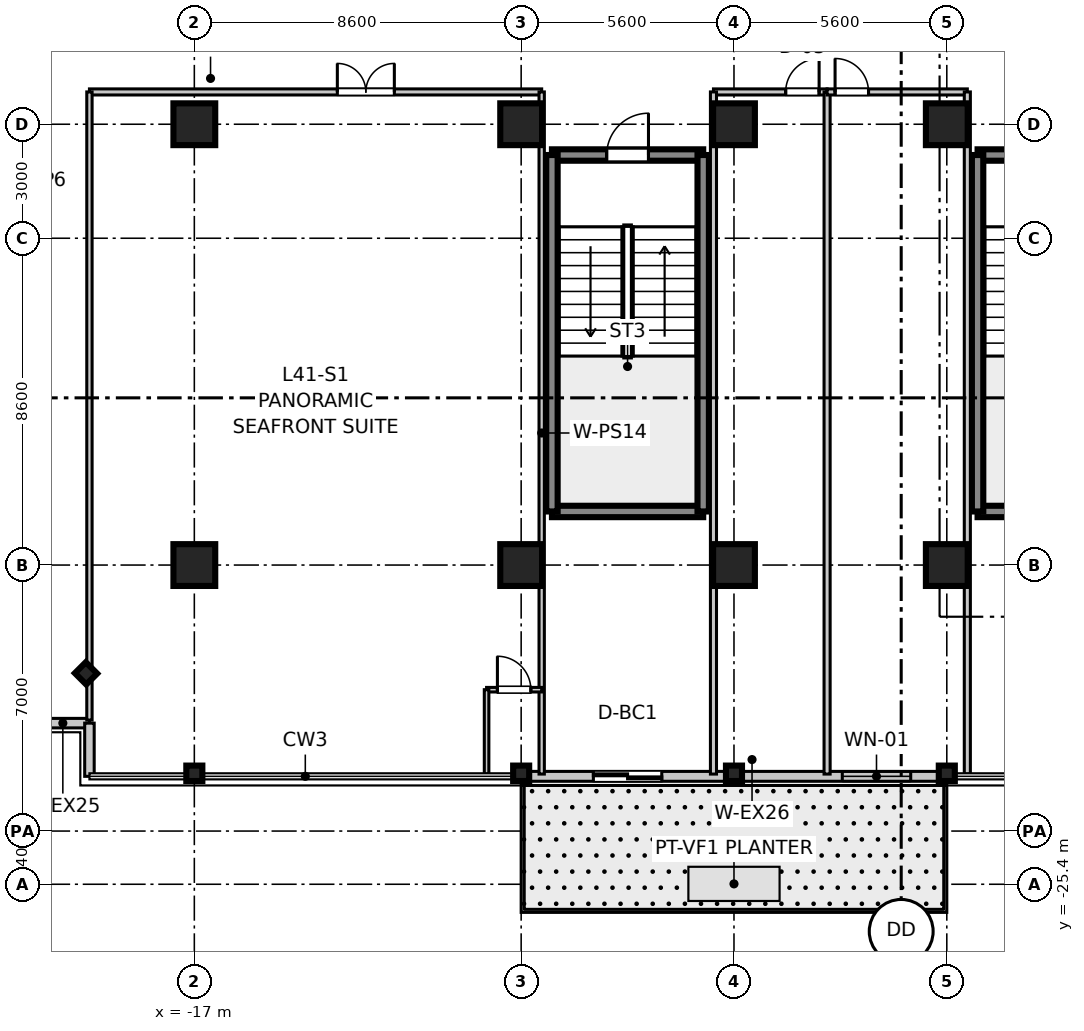
"""IFC4 building model, lengths in metres.
Left out: names, types, materials, properties, quantities, classifications, styles, units other than length and angle.
Written with IfcOpenShell. Run it as: python <this file> out.ifc"""

import sys

from ifc_helpers import new_model, si_unit, direction, frame, frame_2d, origin, origin_2d, place, context, subcontext, project, spatial, rectangle, i_section, extrude, source, transform, mapped, element, fill, save


model = new_model("IFC4")
c1 = context("Model", 3, precision=1e-05, world=origin(), true_north=direction((0.0, 1.0)))
c2 = subcontext(c1, "Body", "Model", "MODEL_VIEW")
j1 = project(units=[si_unit("LENGTHUNIT", "METRE"), si_unit("PLANEANGLEUNIT", "RADIAN")], contexts=[c1])
p1 = place(None, origin())
s1 = spatial("IfcSite", under=j1, at=p1, CompositionType="ELEMENT")
p2 = place(p1, origin())
s2 = spatial("IfcBuilding", under=s1, at=p2, CompositionType="ELEMENT")
p3 = place(p2, frame((0.0, 0.0, 163.6)))
s3 = spatial("IfcBuildingStorey", under=s2, at=p3, CompositionType="ELEMENT", Elevation=163.6)
m1 = source(origin(), c2, "Body", "SweptSolid", [
    extrude(rectangle(XDim=1.1, YDim=1.1, at=origin_2d()), origin(), (0.0, 0.0, 1.0), 3.605),
])
for number, where, z_axis, x_axis in (
    (1, (-17.0, -17.0, 0.0), (0.0, 0.0, 1.0), (1.0, 0.0, 0.0)),
    (2, (-17.0, -5.4, 0.0), (0.0, 0.0, 1.0), (1.0, 0.0, 0.0)),
    (3, (-8.4, -17.0, 0.0), (0.0, 0.0, 1.0), (1.0, 0.0, 0.0)),
    (4, (-8.4, -5.4, 0.0), (0.0, 0.0, 1.0), (1.0, 0.0, 0.0)),
    (5, (-2.8, -17.0, 0.0), (0.0, 0.0, 1.0), (1.0, 0.0, 0.0)),
    (6, (-2.8, -5.4, 0.0), (0.0, 0.0, 1.0), (1.0, 0.0, 0.0)),
    (7, (2.8, -17.0, 0.0), (0.0, 0.0, 1.0), (1.0, 0.0, 0.0)),
    (8, (2.8, -5.4, 0.0), (0.0, 0.0, 1.0), (1.0, 0.0, 0.0)),
):
    element("IfcColumn", number, at=place(p3, frame(where, z_axis=z_axis, x_axis=x_axis)), inside=s3, PredefinedType="COLUMN", context=c2, shape_type="MappedRepresentation", body=[
        mapped(m1, transform((0.0, 0.0, 0.0), scale=1.0)),
    ])
m2 = source(origin(), c2, "Body", "SweptSolid", [
    extrude(i_section(OverallWidth=0.406, OverallDepth=0.422, WebThickness=0.019, FlangeThickness=0.03, at=origin_2d()), origin(), (0.0, 0.0, 1.0), 3.605),
])
for number, where, z_axis, x_axis in (
    (9, (-17.0, -22.48, 0.0), (0.0, 0.0, 1.0), (0.0, 1.0, 0.0)),
    (10, (-8.4, -22.48, 0.0), (0.0, 0.0, 1.0), (0.0, 1.0, 0.0)),
    (11, (-2.8, -22.48, 0.0), (0.0, 0.0, 1.0), (0.0, 1.0, 0.0)),
    (12, (2.8, -22.48, 0.0), (0.0, 0.0, 1.0), (0.0, 1.0, 0.0)),
    (13, (-19.85, -19.85, 0.0), (0.0, 0.0, 1.0), (0.707, 0.707, 0.0)),
):
    element("IfcColumn", number, at=place(p3, frame(where, z_axis=z_axis, x_axis=x_axis)), inside=s3, PredefinedType="COLUMN", context=c2, shape_type="MappedRepresentation", body=[
        mapped(m2, transform((0.0, 0.0, 0.0), scale=1.0)),
    ])
m3 = source(origin(), c2, "Body", "SweptSolid", [
    extrude(rectangle(XDim=3.98, YDim=0.3, at=frame_2d((1.99, 0.0))), origin(), (0.0, 0.0, 1.0), 3.39),
])
for number, where, z_axis, x_axis in (
    (14, (3.61, -15.59, 0.0), (0.0, 0.0, 1.0), (1.0, 0.0, 0.0)),
    (15, (3.61, -6.21, 0.0), (0.0, 0.0, 1.0), (1.0, 0.0, 0.0)),
):
    element("IfcWall", number, at=place(p3, frame(where, z_axis=z_axis, x_axis=x_axis)), inside=s3, PredefinedType="SHEAR", context=c2, shape_type="MappedRepresentation", body=[
        mapped(m3, transform((0.0, 0.0, 0.0), scale=1.0)),
    ])
m4 = source(origin(), c2, "Body", "SweptSolid", [
    extrude(rectangle(XDim=9.38, YDim=0.3, at=frame_2d((4.69, 0.0))), origin(), (0.0, 0.0, 1.0), 3.39),
])
p4 = place(p3, frame((3.61, -15.59, 0.0), z_axis=(0.0, 0.0, 1.0), x_axis=(0.0, 1.0, 0.0)))
e16 = element("IfcWall", 16, at=p4, inside=s3, PredefinedType="SHEAR", context=c2, shape_type="MappedRepresentation", body=[
    mapped(m4, transform((0.0, 0.0, 0.0), scale=1.0)),
])
p5 = place(p3, frame((-7.59, -15.59, 0.0), z_axis=(0.0, 0.0, 1.0), x_axis=(1.0, 0.0, 0.0)))
e17 = element("IfcWall", 17, at=p5, inside=s3, PredefinedType="SHEAR", context=c2, shape_type="MappedRepresentation", body=[
    mapped(m3, transform((0.0, 0.0, 0.0), scale=1.0)),
])
p6 = place(p3, frame((-7.59, -6.21, 0.0), z_axis=(0.0, 0.0, 1.0), x_axis=(1.0, 0.0, 0.0)))
e18 = element("IfcWall", 18, at=p6, inside=s3, PredefinedType="SHEAR", context=c2, shape_type="MappedRepresentation", body=[
    mapped(m3, transform((0.0, 0.0, 0.0), scale=1.0)),
])
p7 = place(p6, frame((1.44, 0.0, 0.0)))
e19 = element("IfcOpeningElement", 19, at=p7, cuts=e18, PredefinedType="OPENING", context=c2, shape_type="SweptSolid", body=[
    extrude(rectangle(XDim=1.1, YDim=2.15, at=frame_2d((0.55, 1.075))), frame((0.0, 0.16, 0.0), z_axis=(0.0, -1.0, 0.0), x_axis=(1.0, 0.0, 0.0)), (0.0, 0.0, 1.0), 0.32),
])
for number, where, z_axis, x_axis in (
    (20, (-7.59, -15.59, 0.0), (0.0, 0.0, 1.0), (0.0, 1.0, 0.0)),
    (21, (-3.61, -15.59, 0.0), (0.0, 0.0, 1.0), (0.0, 1.0, 0.0)),
):
    element("IfcWall", number, at=place(p3, frame(where, z_axis=z_axis, x_axis=x_axis)), inside=s3, PredefinedType="SHEAR", context=c2, shape_type="MappedRepresentation", body=[
        mapped(m4, transform((0.0, 0.0, 0.0), scale=1.0)),
    ])
m5 = source(origin(), c2, "Body", "SweptSolid", [
    extrude(rectangle(XDim=1.4, YDim=0.25, at=frame_2d((0.7, 0.0))), origin(), (0.0, 0.0, 1.0), 3.39),
])
p8 = place(p3, frame((-21.16, -21.16, 0.0), z_axis=(0.0, 0.0, 1.0), x_axis=(1.0, 0.0, 0.0)))
e22 = element("IfcWall", 22, at=p8, inside=s3, PredefinedType="STANDARD", context=c2, shape_type="MappedRepresentation", body=[
    mapped(m5, transform((0.0, 0.0, 0.0), scale=1.0)),
])
m6 = source(origin(), c2, "Body", "SweptSolid", [
    extrude(rectangle(XDim=1.4, YDim=0.25, at=frame_2d((0.7, 0.0))), origin(), (0.0, 0.0, 1.0), 3.39),
])
p9 = place(p3, frame((-19.76, -22.56, 0.0), z_axis=(0.0, 0.0, 1.0), x_axis=(0.0, 1.0, 0.0)))
e23 = element("IfcWall", 23, at=p9, inside=s3, PredefinedType="STANDARD", context=c2, shape_type="MappedRepresentation", body=[
    mapped(m6, transform((0.0, 0.0, 0.0), scale=1.0)),
])
m7 = source(origin(), c2, "Body", "SweptSolid", [
    extrude(rectangle(XDim=11.2, YDim=0.26, at=frame_2d((5.6, 0.0))), origin(), (0.0, 0.0, 1.0), 2.87),
])
p10 = place(p3, frame((-8.4, -22.56, 0.0), z_axis=(0.0, 0.0, 1.0), x_axis=(1.0, 0.0, 0.0)))
e24 = element("IfcWall", 24, at=p10, inside=s3, PredefinedType="STANDARD", context=c2, shape_type="MappedRepresentation", body=[
    mapped(m7, transform((0.0, 0.0, 0.0), scale=1.0)),
])
p11 = place(p10, frame((1.9, 0.0, 0.0)))
e25 = element("IfcOpeningElement", 25, at=p11, cuts=e24, PredefinedType="OPENING", context=c2, shape_type="SweptSolid", body=[
    extrude(rectangle(XDim=1.8, YDim=2.25, at=frame_2d((0.9, 1.125))), frame((0.0, 0.14, 0.0), z_axis=(0.0, -1.0, 0.0), x_axis=(1.0, 0.0, 0.0)), (0.0, 0.0, 1.0), 0.28),
])
p12 = place(p10, frame((8.45, 0.0, 0.85)))
e26 = element("IfcOpeningElement", 26, at=p12, cuts=e24, PredefinedType="OPENING", context=c2, shape_type="SweptSolid", body=[
    extrude(rectangle(XDim=1.8, YDim=1.5, at=frame_2d((0.9, 0.75))), frame((0.0, 0.14, 0.0), z_axis=(0.0, -1.0, 0.0), x_axis=(1.0, 0.0, 0.0)), (0.0, 0.0, 1.0), 0.28),
])
m8 = source(origin(), c2, "Body", "SweptSolid", [
    extrude(rectangle(XDim=11.9, YDim=0.16, at=frame_2d((5.95, 0.0))), origin(), (0.0, 0.0, 1.0), 2.73),
])
p13 = place(p3, frame((-19.76, -4.55, 0.0), z_axis=(0.0, 0.0, 1.0), x_axis=(1.0, 0.0, 0.0)))
e27 = element("IfcWall", 27, at=p13, inside=s3, PredefinedType="PARTITIONING", context=c2, shape_type="MappedRepresentation", body=[
    mapped(m8, transform((0.0, 0.0, 0.0), scale=1.0)),
])
p14 = place(p13, frame((6.523, 0.0, 0.0)))
e28 = element("IfcOpeningElement", 28, at=p14, cuts=e27, PredefinedType="OPENING", context=c2, shape_type="SweptSolid", body=[
    extrude(rectangle(XDim=1.5, YDim=2.15, at=frame_2d((0.75, 1.075))), frame((0.0, 0.09, 0.0), z_axis=(0.0, -1.0, 0.0), x_axis=(1.0, 0.0, 0.0)), (0.0, 0.0, 1.0), 0.18),
])
m9 = source(origin(), c2, "Body", "SweptSolid", [
    extrude(rectangle(XDim=16.53, YDim=0.14, at=frame_2d((8.265, 0.0))), origin(), (0.0, 0.0, 1.0), 2.73),
])
p15 = place(p3, frame((-19.76, -21.08, 0.0), z_axis=(0.0, 0.0, 1.0), x_axis=(0.0, 1.0, 0.0)))
e29 = element("IfcWall", 29, at=p15, inside=s3, PredefinedType="PARTITIONING", context=c2, shape_type="MappedRepresentation", body=[
    mapped(m9, transform((0.0, 0.0, 0.0), scale=1.0)),
])
m10 = source(origin(), c2, "Body", "SweptSolid", [
    extrude(rectangle(XDim=17.95, YDim=0.14, at=frame_2d((8.975, 0.0))), origin(), (0.0, 0.0, 1.0), 2.73),
])
p16 = place(p3, frame((-7.86, -22.5, 0.0), z_axis=(0.0, 0.0, 1.0), x_axis=(0.0, 1.0, 0.0)))
e30 = element("IfcWall", 30, at=p16, inside=s3, PredefinedType="PARTITIONING", context=c2, shape_type="MappedRepresentation", body=[
    mapped(m10, transform((0.0, 0.0, 0.0), scale=1.0)),
])
m11 = source(origin(), c2, "Body", "SweptSolid", [
    extrude(rectangle(XDim=1.45, YDim=0.12, at=frame_2d((0.725, 0.0))), origin(), (0.0, 0.0, 1.0), 2.73),
])
p17 = place(p3, frame((-9.31, -20.28, 0.0), z_axis=(0.0, 0.0, 1.0), x_axis=(1.0, 0.0, 0.0)))
e31 = element("IfcWall", 31, at=p17, inside=s3, PredefinedType="PARTITIONING", context=c2, shape_type="MappedRepresentation", body=[
    mapped(m11, transform((0.0, 0.0, 0.0), scale=1.0)),
])
p18 = place(p17, frame((0.285, 0.0, 0.0)))
e32 = element("IfcOpeningElement", 32, at=p18, cuts=e31, PredefinedType="OPENING", context=c2, shape_type="SweptSolid", body=[
    extrude(rectangle(XDim=0.88, YDim=2.1, at=frame_2d((0.44, 1.05))), frame((0.0, 0.07, 0.0), z_axis=(0.0, -1.0, 0.0), x_axis=(1.0, 0.0, 0.0)), (0.0, 0.0, 1.0), 0.14),
])
m12 = source(origin(), c2, "Body", "SweptSolid", [
    extrude(rectangle(XDim=2.22, YDim=0.12, at=frame_2d((1.11, 0.0))), origin(), (0.0, 0.0, 1.0), 2.73),
])
p19 = place(p3, frame((-9.31, -22.5, 0.0), z_axis=(0.0, 0.0, 1.0), x_axis=(0.0, 1.0, 0.0)))
e33 = element("IfcWall", 33, at=p19, inside=s3, PredefinedType="PARTITIONING", context=c2, shape_type="MappedRepresentation", body=[
    mapped(m12, transform((0.0, 0.0, 0.0), scale=1.0)),
])
m13 = source(origin(), c2, "Body", "SweptSolid", [
    extrude(rectangle(XDim=2.99, YDim=0.16, at=frame_2d((1.495, 0.0))), origin(), (0.0, 0.0, 1.0), 2.73),
])
p20 = place(p3, frame((-3.34, -4.55, 0.0), z_axis=(0.0, 0.0, 1.0), x_axis=(1.0, 0.0, 0.0)))
e34 = element("IfcWall", 34, at=p20, inside=s3, PredefinedType="PARTITIONING", context=c2, shape_type="MappedRepresentation", body=[
    mapped(m13, transform((0.0, 0.0, 0.0), scale=1.0)),
])
p21 = place(p20, frame((1.9, 0.0, 0.0)))
e35 = element("IfcOpeningElement", 35, at=p21, cuts=e34, PredefinedType="OPENING", context=c2, shape_type="SweptSolid", body=[
    extrude(rectangle(XDim=0.88, YDim=2.1, at=frame_2d((0.44, 1.05))), frame((0.0, 0.09, 0.0), z_axis=(0.0, -1.0, 0.0), x_axis=(1.0, 0.0, 0.0)), (0.0, 0.0, 1.0), 0.18),
])
m14 = source(origin(), c2, "Body", "SweptSolid", [
    extrude(rectangle(XDim=17.95, YDim=0.16, at=frame_2d((8.975, 0.0))), origin(), (0.0, 0.0, 1.0), 2.73),
])
for number, where, z_axis, x_axis in (
    (36, (-3.34, -22.5, 0.0), (0.0, 0.0, 1.0), (0.0, 1.0, 0.0)),
    (37, (-0.35, -22.5, 0.0), (0.0, 0.0, 1.0), (0.0, 1.0, 0.0)),
):
    element("IfcWall", number, at=place(p3, frame(where, z_axis=z_axis, x_axis=x_axis)), inside=s3, PredefinedType="PARTITIONING", context=c2, shape_type="MappedRepresentation", body=[
        mapped(m14, transform((0.0, 0.0, 0.0), scale=1.0)),
    ])
m15 = source(origin(), c2, "Body", "SweptSolid", [
    extrude(rectangle(XDim=3.69, YDim=0.16, at=frame_2d((1.845, 0.0))), origin(), (0.0, 0.0, 1.0), 2.73),
])
p22 = place(p3, frame((-0.35, -4.55, 0.0), z_axis=(0.0, 0.0, 1.0), x_axis=(1.0, 0.0, 0.0)))
e38 = element("IfcWall", 38, at=p22, inside=s3, PredefinedType="PARTITIONING", context=c2, shape_type="MappedRepresentation", body=[
    mapped(m15, transform((0.0, 0.0, 0.0), scale=1.0)),
])
p23 = place(p22, frame((0.21, 0.0, 0.0)))
e39 = element("IfcOpeningElement", 39, at=p23, cuts=e38, PredefinedType="OPENING", context=c2, shape_type="SweptSolid", body=[
    extrude(rectangle(XDim=0.88, YDim=2.1, at=frame_2d((0.44, 1.05))), frame((0.0, 0.09, 0.0), z_axis=(0.0, -1.0, 0.0), x_axis=(1.0, 0.0, 0.0)), (0.0, 0.0, 1.0), 0.18),
])
p24 = place(p3, frame((3.34, -22.5, 0.0), z_axis=(0.0, 0.0, 1.0), x_axis=(0.0, 1.0, 0.0)))
e40 = element("IfcWall", 40, at=p24, inside=s3, PredefinedType="PARTITIONING", context=c2, shape_type="MappedRepresentation", body=[
    mapped(m14, transform((0.0, 0.0, 0.0), scale=1.0)),
])
m16 = source(origin(), c2, "Body", "SweptSolid", [
    extrude(rectangle(XDim=1.1, YDim=2.15, at=frame_2d((0.55, 1.075))), frame((0.0, 0.025, 0.0), z_axis=(0.0, -1.0, 0.0), x_axis=(1.0, 0.0, 0.0)), (0.0, 0.0, 1.0), 0.05),
])
p25 = place(p7, frame((1.1, 0.0, 0.0), z_axis=(0.0, 0.0, 1.0), x_axis=(-1.0, 0.0, 0.0)))
e41 = element("IfcDoor", 41, at=p25, inside=s3, OperationType="SINGLE_SWING_RIGHT", PredefinedType="DOOR", context=c2, shape_type="MappedRepresentation", body=[
    mapped(m16, transform((0.0, 0.0, 0.0), scale=1.0)),
])
fill(e19, e41)
m17 = source(origin(), c2, "Body", "SweptSolid", [
    extrude(rectangle(XDim=0.88, YDim=2.1, at=frame_2d((0.44, 1.05))), frame((0.0, 0.025, 0.0), z_axis=(0.0, -1.0, 0.0), x_axis=(1.0, 0.0, 0.0)), (0.0, 0.0, 1.0), 0.05),
])
p26 = place(p18, frame((0.88, 0.0, 0.0), z_axis=(0.0, 0.0, 1.0), x_axis=(-1.0, 0.0, 0.0)))
e42 = element("IfcDoor", 42, at=p26, inside=s3, OperationType="SINGLE_SWING_LEFT", PredefinedType="DOOR", context=c2, shape_type="MappedRepresentation", body=[
    mapped(m17, transform((0.0, 0.0, 0.0), scale=1.0)),
])
fill(e32, e42)
m18 = source(origin(), c2, "Body", "SweptSolid", [
    extrude(rectangle(XDim=1.5, YDim=2.15, at=frame_2d((0.75, 1.075))), frame((0.0, 0.025, 0.0), z_axis=(0.0, -1.0, 0.0), x_axis=(1.0, 0.0, 0.0)), (0.0, 0.0, 1.0), 0.05),
])
p27 = place(p14, frame((1.5, 0.0, 0.0), z_axis=(0.0, 0.0, 1.0), x_axis=(-1.0, 0.0, 0.0)))
e43 = element("IfcDoor", 43, at=p27, inside=s3, OperationType="DOUBLE_DOOR_SINGLE_SWING", PredefinedType="DOOR", context=c2, shape_type="MappedRepresentation", body=[
    mapped(m18, transform((0.0, 0.0, 0.0), scale=1.0)),
])
fill(e28, e43)
p28 = place(p21, frame((0.88, 0.0, 0.0), z_axis=(0.0, 0.0, 1.0), x_axis=(-1.0, 0.0, 0.0)))
e44 = element("IfcDoor", 44, at=p28, inside=s3, OperationType="SINGLE_SWING_RIGHT", PredefinedType="DOOR", context=c2, shape_type="MappedRepresentation", body=[
    mapped(m17, transform((0.0, 0.0, 0.0), scale=1.0)),
])
fill(e35, e44)
p29 = place(p23, frame((0.88, 0.0, 0.0), z_axis=(0.0, 0.0, 1.0), x_axis=(-1.0, 0.0, 0.0)))
e45 = element("IfcDoor", 45, at=p29, inside=s3, OperationType="SINGLE_SWING_LEFT", PredefinedType="DOOR", context=c2, shape_type="MappedRepresentation", body=[
    mapped(m17, transform((0.0, 0.0, 0.0), scale=1.0)),
])
fill(e39, e45)
m19 = source(origin(), c2, "Body", "SweptSolid", [
    extrude(rectangle(XDim=1.8, YDim=2.25, at=frame_2d((0.9, 1.125))), frame((0.0, 0.025, 0.0), z_axis=(0.0, -1.0, 0.0), x_axis=(1.0, 0.0, 0.0)), (0.0, 0.0, 1.0), 0.05),
])
p30 = place(p11, frame((1.8, 0.0, 0.0), z_axis=(0.0, 0.0, 1.0), x_axis=(-1.0, 0.0, 0.0)))
e46 = element("IfcDoor", 46, at=p30, inside=s3, OperationType="DOUBLE_DOOR_SLIDING", PredefinedType="DOOR", context=c2, shape_type="MappedRepresentation", body=[
    mapped(m19, transform((0.0, 0.0, 0.0), scale=1.0)),
])
fill(e25, e46)
m20 = source(origin(), c2, "Body", "SweptSolid", [
    extrude(rectangle(XDim=1.8, YDim=1.5, at=frame_2d((0.9, 0.75))), frame((0.0, 0.03, 0.0), z_axis=(0.0, -1.0, 0.0), x_axis=(1.0, 0.0, 0.0)), (0.0, 0.0, 1.0), 0.06),
])
p31 = place(p12, origin())
e47 = element("IfcWindow", 47, at=p31, inside=s3, PartitioningType="SINGLE_PANEL", PredefinedType="WINDOW", context=c2, shape_type="MappedRepresentation", body=[
    mapped(m20, transform((0.0, 0.0, 0.0), scale=1.0)),
])
fill(e26, e47)
save(model, sys.argv[1])
